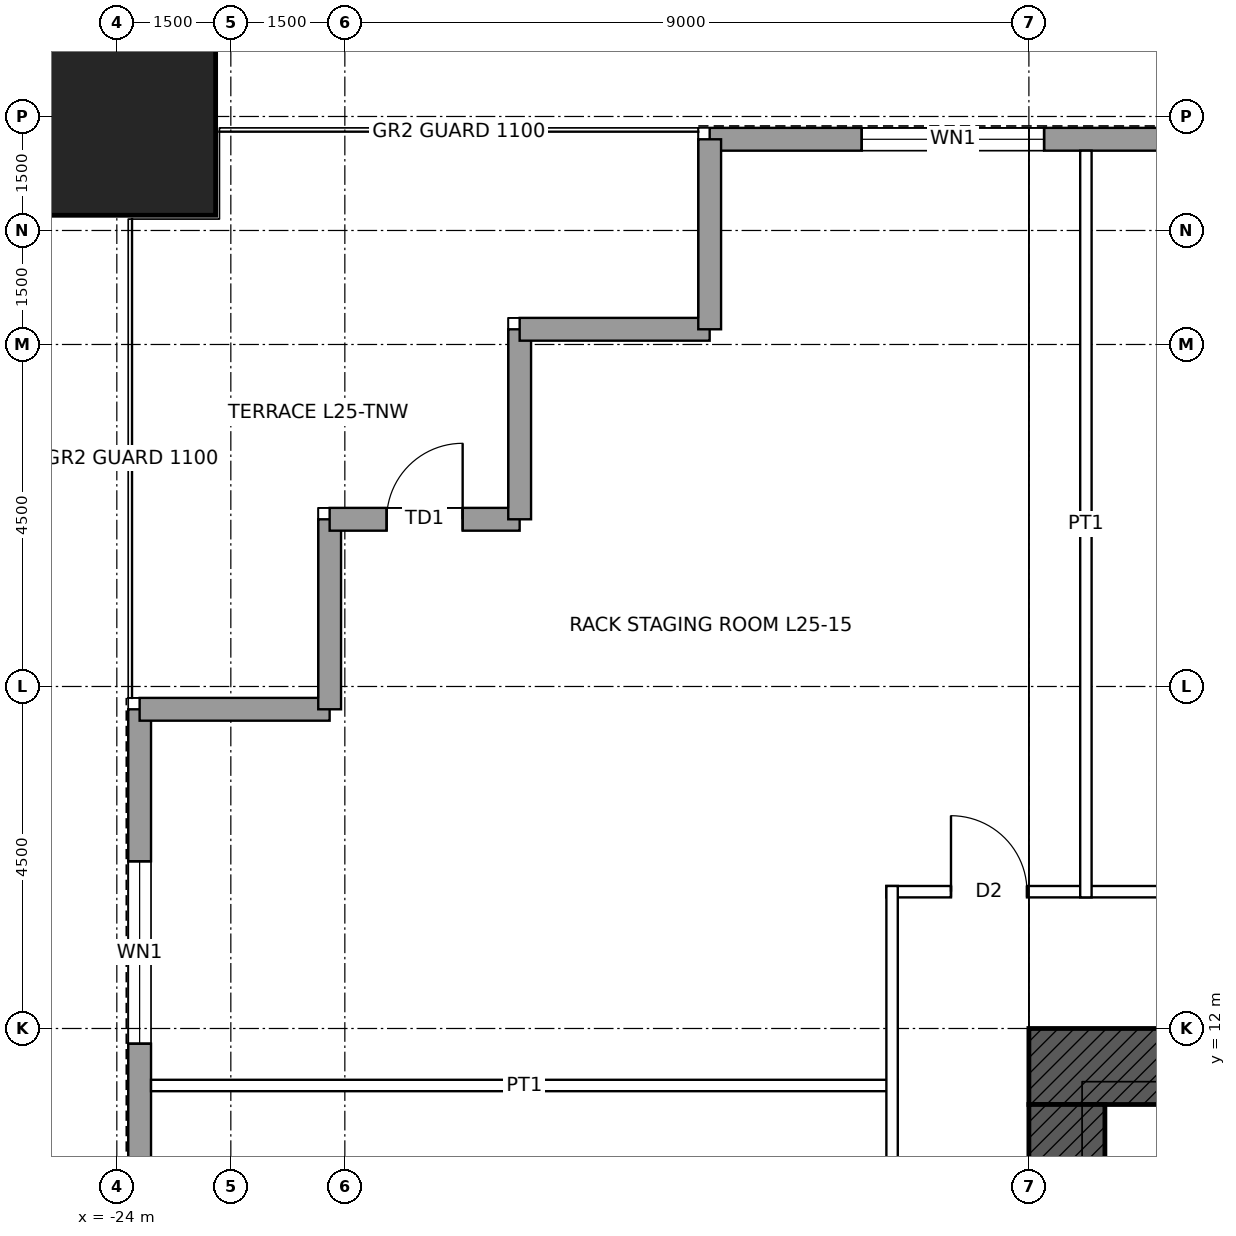
"""IFC4 building model, lengths in metres.
Left out: names, types, materials, properties, quantities, classifications, styles, units other than length and angle.
Written with IfcOpenShell. Run it as: python <this file> out.ifc"""

import sys

from ifc_helpers import new_model, si_unit, direction, frame, frame_2d, origin, origin_2d, place, context, subcontext, project, spatial, rectangle, hollow_rectangle, extrude, element, fill, save


model = new_model("IFC4")
c1 = context("Model", 3, precision=1e-05, world=origin(), true_north=direction((0.0, 1.0)))
c2 = subcontext(c1, "Body", "Model", "MODEL_VIEW")
j1 = project(units=[si_unit("LENGTHUNIT", "METRE"), si_unit("PLANEANGLEUNIT", "RADIAN")], contexts=[c1])
p1 = place(None, origin())
s1 = spatial("IfcSite", under=j1, at=p1, CompositionType="ELEMENT")
p2 = place(p1, origin())
s2 = spatial("IfcBuilding", under=s1, at=p2, CompositionType="ELEMENT")
p3 = place(p2, frame((0.0, 0.0, 126.9)))
s3 = spatial("IfcBuildingStorey", under=s2, at=p3, CompositionType="ELEMENT", Elevation=126.9)
p4 = place(p3, frame((-24.0, 24.0, 0.0), z_axis=(0.0, 0.0, 1.0), x_axis=(1.0, 0.0, 0.0)))
e1 = element("IfcColumn", 1, at=p4, inside=s3, PredefinedType="COLUMN", context=c2, shape_type="SweptSolid", body=[
    extrude(hollow_rectangle(XDim=2.6, YDim=2.6, WallThickness=0.13, at=origin_2d()), origin(), (0.0, 0.0, 1.0), 4.5),
])
p5 = place(p3, frame((-12.0, 11.5, 0.0), z_axis=(0.0, 0.0, 1.0), x_axis=(1.0, 0.0, 0.0)))
e2 = element("IfcWall", 2, at=p5, inside=s3, PredefinedType="SHEAR", context=c2, shape_type="SweptSolid", body=[
    extrude(rectangle(XDim=24.0, YDim=1.0, at=frame_2d((12.0, 0.0))), origin(), (0.0, 0.0, 1.0), 4.5),
])
p6 = place(p5, frame((6.25, 0.0, 0.0)))
e3 = element("IfcOpeningElement", 3, at=p6, cuts=e2, PredefinedType="OPENING", context=c2, shape_type="SweptSolid", body=[
    extrude(rectangle(XDim=1.0, YDim=2.4, at=frame_2d((0.5, 1.2))), frame((0.0, 0.51, 0.0), z_axis=(0.0, -1.0, 0.0), x_axis=(1.0, 0.0, 0.0)), (0.0, 0.0, 1.0), 1.02),
])
p7 = place(p5, frame((16.75, 0.0, 0.0)))
e4 = element("IfcOpeningElement", 4, at=p7, cuts=e2, PredefinedType="OPENING", context=c2, shape_type="SweptSolid", body=[
    extrude(rectangle(XDim=1.0, YDim=2.4, at=frame_2d((0.5, 1.2))), frame((0.0, 0.51, 0.0), z_axis=(0.0, -1.0, 0.0), x_axis=(1.0, 0.0, 0.0)), (0.0, 0.0, 1.0), 1.02),
])
p8 = place(p3, frame((-11.5, -11.0, 0.0), z_axis=(0.0, 0.0, 1.0), x_axis=(0.0, 1.0, 0.0)))
e5 = element("IfcWall", 5, at=p8, inside=s3, PredefinedType="SHEAR", context=c2, shape_type="SweptSolid", body=[
    extrude(rectangle(XDim=22.0, YDim=1.0, at=frame_2d((11.0, 0.0))), origin(), (0.0, 0.0, 1.0), 4.5),
])
p9 = place(p8, frame((10.5, 0.0, 0.0)))
e6 = element("IfcOpeningElement", 6, at=p9, cuts=e5, PredefinedType="OPENING", context=c2, shape_type="SweptSolid", body=[
    extrude(rectangle(XDim=1.0, YDim=2.4, at=frame_2d((0.5, 1.2))), frame((0.0, 0.51, 0.0), z_axis=(0.0, -1.0, 0.0), x_axis=(1.0, 0.0, 0.0)), (0.0, 0.0, 1.0), 1.02),
])
p10 = place(p3, frame((-16.2, 23.7, 0.0), z_axis=(0.0, 0.0, 1.0), x_axis=(1.0, 0.0, 0.0)))
e7 = element("IfcWall", 7, at=p10, inside=s3, PredefinedType="SOLIDWALL", context=c2, shape_type="SweptSolid", body=[
    extrude(rectangle(XDim=32.4, YDim=0.3, at=frame_2d((16.2, 0.0))), origin(), (0.0, 0.0, 1.0), 4.3),
])
p11 = place(p10, frame((2.0, 0.0, 1.0)))
e8 = element("IfcOpeningElement", 8, at=p11, cuts=e7, PredefinedType="OPENING", context=c2, shape_type="SweptSolid", body=[
    extrude(rectangle(XDim=2.4, YDim=1.2, at=frame_2d((1.2, 0.6))), frame((0.0, 0.16, 0.0), z_axis=(0.0, -1.0, 0.0), x_axis=(1.0, 0.0, 0.0)), (0.0, 0.0, 1.0), 0.32),
])
p12 = place(p10, frame((7.25, 0.0, 1.0)))
e9 = element("IfcOpeningElement", 9, at=p12, cuts=e7, PredefinedType="OPENING", context=c2, shape_type="SweptSolid", body=[
    extrude(rectangle(XDim=2.4, YDim=1.2, at=frame_2d((1.2, 0.6))), frame((0.0, 0.16, 0.0), z_axis=(0.0, -1.0, 0.0), x_axis=(1.0, 0.0, 0.0)), (0.0, 0.0, 1.0), 0.32),
])
p13 = place(p10, frame((9.95, 0.0, 1.0)))
e10 = element("IfcOpeningElement", 10, at=p13, cuts=e7, PredefinedType="OPENING", context=c2, shape_type="SweptSolid", body=[
    extrude(rectangle(XDim=2.4, YDim=1.2, at=frame_2d((1.2, 0.6))), frame((0.0, 0.16, 0.0), z_axis=(0.0, -1.0, 0.0), x_axis=(1.0, 0.0, 0.0)), (0.0, 0.0, 1.0), 0.32),
])
p14 = place(p10, frame((13.0, 0.0, 1.0)))
e11 = element("IfcOpeningElement", 11, at=p14, cuts=e7, PredefinedType="OPENING", context=c2, shape_type="SweptSolid", body=[
    extrude(rectangle(XDim=2.4, YDim=1.2, at=frame_2d((1.2, 0.6))), frame((0.0, 0.16, 0.0), z_axis=(0.0, -1.0, 0.0), x_axis=(1.0, 0.0, 0.0)), (0.0, 0.0, 1.0), 0.32),
])
p15 = place(p10, frame((17.0, 0.0, 1.0)))
e12 = element("IfcOpeningElement", 12, at=p15, cuts=e7, PredefinedType="OPENING", context=c2, shape_type="SweptSolid", body=[
    extrude(rectangle(XDim=2.4, YDim=1.2, at=frame_2d((1.2, 0.6))), frame((0.0, 0.16, 0.0), z_axis=(0.0, -1.0, 0.0), x_axis=(1.0, 0.0, 0.0)), (0.0, 0.0, 1.0), 0.32),
])
p16 = place(p10, frame((20.5, 0.0, 1.0)))
e13 = element("IfcOpeningElement", 13, at=p16, cuts=e7, PredefinedType="OPENING", context=c2, shape_type="SweptSolid", body=[
    extrude(rectangle(XDim=2.4, YDim=1.2, at=frame_2d((1.2, 0.6))), frame((0.0, 0.16, 0.0), z_axis=(0.0, -1.0, 0.0), x_axis=(1.0, 0.0, 0.0)), (0.0, 0.0, 1.0), 0.32),
])
p17 = place(p10, frame((23.35, 0.0, 1.0)))
e14 = element("IfcOpeningElement", 14, at=p17, cuts=e7, PredefinedType="OPENING", context=c2, shape_type="SweptSolid", body=[
    extrude(rectangle(XDim=1.8, YDim=1.2, at=frame_2d((0.9, 0.6))), frame((0.0, 0.16, 0.0), z_axis=(0.0, -1.0, 0.0), x_axis=(1.0, 0.0, 0.0)), (0.0, 0.0, 1.0), 0.32),
])
p18 = place(p10, frame((28.0, 0.0, 1.0)))
e15 = element("IfcOpeningElement", 15, at=p18, cuts=e7, PredefinedType="OPENING", context=c2, shape_type="SweptSolid", body=[
    extrude(rectangle(XDim=2.4, YDim=1.2, at=frame_2d((1.2, 0.6))), frame((0.0, 0.16, 0.0), z_axis=(0.0, -1.0, 0.0), x_axis=(1.0, 0.0, 0.0)), (0.0, 0.0, 1.0), 0.32),
])
p19 = place(p3, frame((-23.7, -16.2, 0.0), z_axis=(0.0, 0.0, 1.0), x_axis=(0.0, 1.0, 0.0)))
e16 = element("IfcWall", 16, at=p19, inside=s3, PredefinedType="SOLIDWALL", context=c2, shape_type="SweptSolid", body=[
    extrude(rectangle(XDim=32.4, YDim=0.3, at=frame_2d((16.2, 0.0))), origin(), (0.0, 0.0, 1.0), 4.3),
])
p20 = place(p19, frame((2.0, 0.0, 1.0)))
e17 = element("IfcOpeningElement", 17, at=p20, cuts=e16, PredefinedType="OPENING", context=c2, shape_type="SweptSolid", body=[
    extrude(rectangle(XDim=2.4, YDim=1.2, at=frame_2d((1.2, 0.6))), frame((0.0, 0.16, 0.0), z_axis=(0.0, -1.0, 0.0), x_axis=(1.0, 0.0, 0.0)), (0.0, 0.0, 1.0), 0.32),
])
p21 = place(p19, frame((7.25, 0.0, 1.0)))
e18 = element("IfcOpeningElement", 18, at=p21, cuts=e16, PredefinedType="OPENING", context=c2, shape_type="SweptSolid", body=[
    extrude(rectangle(XDim=2.4, YDim=1.2, at=frame_2d((1.2, 0.6))), frame((0.0, 0.16, 0.0), z_axis=(0.0, -1.0, 0.0), x_axis=(1.0, 0.0, 0.0)), (0.0, 0.0, 1.0), 0.32),
])
p22 = place(p19, frame((9.95, 0.0, 1.0)))
e19 = element("IfcOpeningElement", 19, at=p22, cuts=e16, PredefinedType="OPENING", context=c2, shape_type="SweptSolid", body=[
    extrude(rectangle(XDim=2.4, YDim=1.2, at=frame_2d((1.2, 0.6))), frame((0.0, 0.16, 0.0), z_axis=(0.0, -1.0, 0.0), x_axis=(1.0, 0.0, 0.0)), (0.0, 0.0, 1.0), 0.32),
])
p23 = place(p19, frame((13.0, 0.0, 1.0)))
e20 = element("IfcOpeningElement", 20, at=p23, cuts=e16, PredefinedType="OPENING", context=c2, shape_type="SweptSolid", body=[
    extrude(rectangle(XDim=2.4, YDim=1.2, at=frame_2d((1.2, 0.6))), frame((0.0, 0.16, 0.0), z_axis=(0.0, -1.0, 0.0), x_axis=(1.0, 0.0, 0.0)), (0.0, 0.0, 1.0), 0.32),
])
p24 = place(p19, frame((17.0, 0.0, 1.0)))
e21 = element("IfcOpeningElement", 21, at=p24, cuts=e16, PredefinedType="OPENING", context=c2, shape_type="SweptSolid", body=[
    extrude(rectangle(XDim=2.4, YDim=1.2, at=frame_2d((1.2, 0.6))), frame((0.0, 0.16, 0.0), z_axis=(0.0, -1.0, 0.0), x_axis=(1.0, 0.0, 0.0)), (0.0, 0.0, 1.0), 0.32),
])
p25 = place(p19, frame((20.05, 0.0, 1.0)))
e22 = element("IfcOpeningElement", 22, at=p25, cuts=e16, PredefinedType="OPENING", context=c2, shape_type="SweptSolid", body=[
    extrude(rectangle(XDim=2.4, YDim=1.2, at=frame_2d((1.2, 0.6))), frame((0.0, 0.16, 0.0), z_axis=(0.0, -1.0, 0.0), x_axis=(1.0, 0.0, 0.0)), (0.0, 0.0, 1.0), 0.32),
])
p26 = place(p19, frame((22.75, 0.0, 1.0)))
e23 = element("IfcOpeningElement", 23, at=p26, cuts=e16, PredefinedType="OPENING", context=c2, shape_type="SweptSolid", body=[
    extrude(rectangle(XDim=2.4, YDim=1.2, at=frame_2d((1.2, 0.6))), frame((0.0, 0.16, 0.0), z_axis=(0.0, -1.0, 0.0), x_axis=(1.0, 0.0, 0.0)), (0.0, 0.0, 1.0), 0.32),
])
p27 = place(p19, frame((28.0, 0.0, 1.0)))
e24 = element("IfcOpeningElement", 24, at=p27, cuts=e16, PredefinedType="OPENING", context=c2, shape_type="SweptSolid", body=[
    extrude(rectangle(XDim=2.4, YDim=1.2, at=frame_2d((1.2, 0.6))), frame((0.0, 0.16, 0.0), z_axis=(0.0, -1.0, 0.0), x_axis=(1.0, 0.0, 0.0)), (0.0, 0.0, 1.0), 0.32),
])
for number, where, z_axis, x_axis in (
    (25, (-23.7, 16.2, 0.0), (0.0, 0.0, 1.0), (1.0, 0.0, 0.0)),
    (26, (-21.2, 16.2, 0.0), (0.0, 0.0, 1.0), (0.0, 1.0, 0.0)),
):
    element("IfcWall", number, at=place(p3, frame(where, z_axis=z_axis, x_axis=x_axis)), inside=s3, PredefinedType="SOLIDWALL", context=c2, shape_type="SweptSolid", body=[
        extrude(rectangle(XDim=2.5, YDim=0.3, at=frame_2d((1.25, 0.0))), origin(), (0.0, 0.0, 1.0), 4.3),
    ])
p28 = place(p3, frame((-21.2, 18.7, 0.0), z_axis=(0.0, 0.0, 1.0), x_axis=(1.0, 0.0, 0.0)))
e27 = element("IfcWall", 27, at=p28, inside=s3, PredefinedType="SOLIDWALL", context=c2, shape_type="SweptSolid", body=[
    extrude(rectangle(XDim=2.5, YDim=0.3, at=frame_2d((1.25, 0.0))), origin(), (0.0, 0.0, 1.0), 4.3),
])
p29 = place(p28, frame((0.75, 0.0, 0.0)))
e28 = element("IfcOpeningElement", 28, at=p29, cuts=e27, PredefinedType="OPENING", context=c2, shape_type="SweptSolid", body=[
    extrude(rectangle(XDim=1.0, YDim=2.4, at=frame_2d((0.5, 1.2))), frame((0.0, 0.16, 0.0), z_axis=(0.0, -1.0, 0.0), x_axis=(1.0, 0.0, 0.0)), (0.0, 0.0, 1.0), 0.32),
])
for number, where, z_axis, x_axis in (
    (29, (-18.7, 18.7, 0.0), (0.0, 0.0, 1.0), (0.0, 1.0, 0.0)),
    (30, (-18.7, 21.2, 0.0), (0.0, 0.0, 1.0), (1.0, 0.0, 0.0)),
    (31, (-16.2, 21.2, 0.0), (0.0, 0.0, 1.0), (0.0, 1.0, 0.0)),
):
    element("IfcWall", number, at=place(p3, frame(where, z_axis=z_axis, x_axis=x_axis)), inside=s3, PredefinedType="SOLIDWALL", context=c2, shape_type="SweptSolid", body=[
        extrude(rectangle(XDim=2.5, YDim=0.3, at=frame_2d((1.25, 0.0))), origin(), (0.0, 0.0, 1.0), 4.3),
    ])
p30 = place(p3, frame((-23.55, 11.25, 0.0), z_axis=(0.0, 0.0, 1.0), x_axis=(1.0, 0.0, 0.0)))
e32 = element("IfcWall", 32, at=p30, inside=s3, PredefinedType="PARTITIONING", context=c2, shape_type="SweptSolid", body=[
    extrude(rectangle(XDim=9.825, YDim=0.15, at=frame_2d((4.913, 0.0))), origin(), (0.0, 0.0, 1.0), 3.431),
])
p31 = place(p3, frame((-13.875, 13.8, 0.0), z_axis=(0.0, 0.0, 1.0), x_axis=(1.0, 0.0, 0.0)))
e33 = element("IfcWall", 33, at=p31, inside=s3, PredefinedType="PARTITIONING", context=c2, shape_type="SweptSolid", body=[
    extrude(rectangle(XDim=27.75, YDim=0.15, at=frame_2d((13.875, 0.0))), origin(), (0.0, 0.0, 1.0), 4.3),
])
p32 = place(p31, frame((5.475, 0.0, 0.0)))
e34 = element("IfcOpeningElement", 34, at=p32, cuts=e33, PredefinedType="OPENING", context=c2, shape_type="SweptSolid", body=[
    extrude(rectangle(XDim=1.8, YDim=2.4, at=frame_2d((0.9, 1.2))), frame((0.0, 0.085, 0.0), z_axis=(0.0, -1.0, 0.0), x_axis=(1.0, 0.0, 0.0)), (0.0, 0.0, 1.0), 0.17),
])
p33 = place(p31, frame((13.375, 0.0, 0.0)))
e35 = element("IfcOpeningElement", 35, at=p33, cuts=e33, PredefinedType="OPENING", context=c2, shape_type="SweptSolid", body=[
    extrude(rectangle(XDim=1.0, YDim=2.1, at=frame_2d((0.5, 1.05))), frame((0.0, 0.085, 0.0), z_axis=(0.0, -1.0, 0.0), x_axis=(1.0, 0.0, 0.0)), (0.0, 0.0, 1.0), 0.17),
])
p34 = place(p31, frame((20.475, 0.0, 0.0)))
e36 = element("IfcOpeningElement", 36, at=p34, cuts=e33, PredefinedType="OPENING", context=c2, shape_type="SweptSolid", body=[
    extrude(rectangle(XDim=1.8, YDim=2.4, at=frame_2d((0.9, 1.2))), frame((0.0, 0.085, 0.0), z_axis=(0.0, -1.0, 0.0), x_axis=(1.0, 0.0, 0.0)), (0.0, 0.0, 1.0), 0.17),
])
p35 = place(p31, frame((25.9, 0.0, 0.0)))
e37 = element("IfcOpeningElement", 37, at=p35, cuts=e33, PredefinedType="OPENING", context=c2, shape_type="SweptSolid", body=[
    extrude(rectangle(XDim=1.0, YDim=2.1, at=frame_2d((0.5, 1.05))), frame((0.0, 0.085, 0.0), z_axis=(0.0, -1.0, 0.0), x_axis=(1.0, 0.0, 0.0)), (0.0, 0.0, 1.0), 0.17),
])
p36 = place(p31, frame((0.85, 0.0, 0.0)))
e38 = element("IfcOpeningElement", 38, at=p36, cuts=e33, PredefinedType="OPENING", context=c2, shape_type="SweptSolid", body=[
    extrude(rectangle(XDim=1.0, YDim=2.1, at=frame_2d((0.5, 1.05))), frame((0.0, 0.085, 0.0), z_axis=(0.0, -1.0, 0.0), x_axis=(1.0, 0.0, 0.0)), (0.0, 0.0, 1.0), 0.17),
])
p37 = place(p3, frame((-13.8, -13.875, 0.0), z_axis=(0.0, 0.0, 1.0), x_axis=(0.0, 1.0, 0.0)))
e39 = element("IfcWall", 39, at=p37, inside=s3, PredefinedType="PARTITIONING", context=c2, shape_type="SweptSolid", body=[
    extrude(rectangle(XDim=27.75, YDim=0.15, at=frame_2d((13.875, 0.0))), origin(), (0.0, 0.0, 1.0), 4.3),
])
p38 = place(p37, frame((7.75, 0.0, 0.0)))
e40 = element("IfcOpeningElement", 40, at=p38, cuts=e39, PredefinedType="OPENING", context=c2, shape_type="SweptSolid", body=[
    extrude(rectangle(XDim=1.0, YDim=2.1, at=frame_2d((0.5, 1.05))), frame((0.0, 0.085, 0.0), z_axis=(0.0, -1.0, 0.0), x_axis=(1.0, 0.0, 0.0)), (0.0, 0.0, 1.0), 0.17),
])
p39 = place(p37, frame((18.6, 0.0, 0.0)))
e41 = element("IfcOpeningElement", 41, at=p39, cuts=e39, PredefinedType="OPENING", context=c2, shape_type="SweptSolid", body=[
    extrude(rectangle(XDim=1.8, YDim=2.4, at=frame_2d((0.9, 1.2))), frame((0.0, 0.085, 0.0), z_axis=(0.0, -1.0, 0.0), x_axis=(1.0, 0.0, 0.0)), (0.0, 0.0, 1.0), 0.17),
])
p40 = place(p3, frame((-11.25, 13.725, 0.0), z_axis=(0.0, 0.0, 1.0), x_axis=(0.0, 1.0, 0.0)))
e42 = element("IfcWall", 42, at=p40, inside=s3, PredefinedType="PARTITIONING", context=c2, shape_type="SweptSolid", body=[
    extrude(rectangle(XDim=9.825, YDim=0.15, at=frame_2d((4.913, 0.0))), origin(), (0.0, 0.0, 1.0), 3.431),
])
p41 = place(p11, origin())
e43 = element("IfcWindow", 43, at=p41, inside=s3, PartitioningType="SINGLE_PANEL", PredefinedType="WINDOW", context=c2, shape_type="SweptSolid", body=[
    extrude(rectangle(XDim=2.4, YDim=1.2, at=frame_2d((1.2, 0.6))), frame((0.0, 0.03, 0.0), z_axis=(0.0, -1.0, 0.0), x_axis=(1.0, 0.0, 0.0)), (0.0, 0.0, 1.0), 0.06),
])
fill(e8, e43)
p42 = place(p27, origin())
e44 = element("IfcWindow", 44, at=p42, inside=s3, PartitioningType="SINGLE_PANEL", PredefinedType="WINDOW", context=c2, shape_type="SweptSolid", body=[
    extrude(rectangle(XDim=2.4, YDim=1.2, at=frame_2d((1.2, 0.6))), frame((0.0, 0.03, 0.0), z_axis=(0.0, -1.0, 0.0), x_axis=(1.0, 0.0, 0.0)), (0.0, 0.0, 1.0), 0.06),
])
fill(e24, e44)
p43 = place(p29, origin())
e45 = element("IfcDoor", 45, at=p43, inside=s3, OperationType="SINGLE_SWING_RIGHT", PredefinedType="DOOR", context=c2, shape_type="SweptSolid", body=[
    extrude(rectangle(XDim=1.0, YDim=2.4, at=frame_2d((0.5, 1.2))), frame((0.0, 0.025, 0.0), z_axis=(0.0, -1.0, 0.0), x_axis=(1.0, 0.0, 0.0)), (0.0, 0.0, 1.0), 0.05),
])
fill(e28, e45)
p44 = place(p36, origin())
e46 = element("IfcDoor", 46, at=p44, inside=s3, OperationType="SINGLE_SWING_LEFT", PredefinedType="DOOR", context=c2, shape_type="SweptSolid", body=[
    extrude(rectangle(XDim=1.0, YDim=2.1, at=frame_2d((0.5, 1.05))), frame((0.0, 0.025, 0.0), z_axis=(0.0, -1.0, 0.0), x_axis=(1.0, 0.0, 0.0)), (0.0, 0.0, 1.0), 0.05),
])
fill(e38, e46)
save(model, sys.argv[1])
